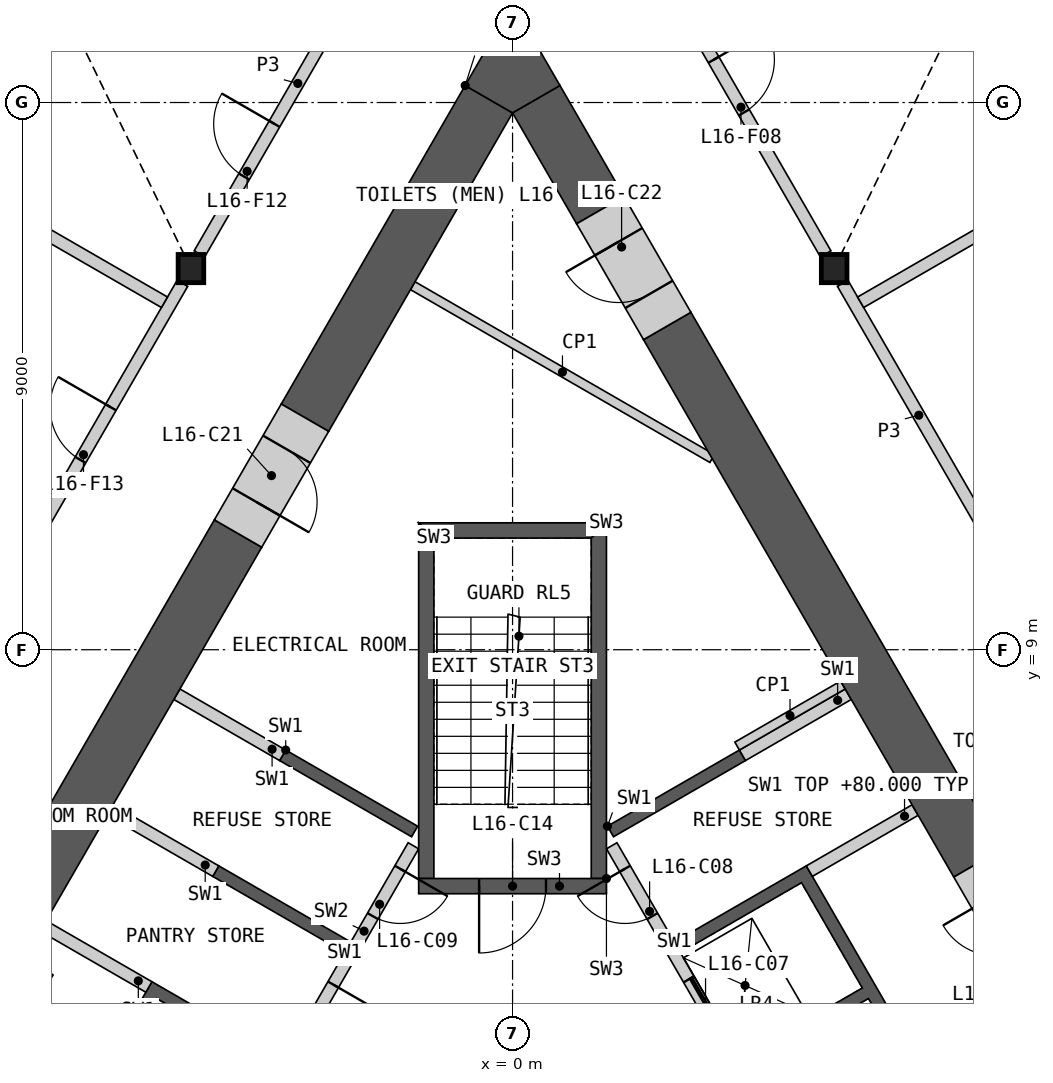
"""IFC4 building model, lengths in metres.
Left out: names, types, materials, properties, quantities, classifications, styles, units other than length and angle.
Written with IfcOpenShell. Run it as: python <this file> out.ifc"""

import sys

from ifc_helpers import new_model, si_unit, direction, frame, frame_2d, origin, origin_2d, place, context, subcontext, project, spatial, polyline, rectangle, i_section, outline, extrude, element, fill, save


model = new_model("IFC4")
c1 = context("Model", 3, precision=1e-05, world=origin(), true_north=direction((0.0, 1.0)))
c2 = subcontext(c1, "Body", "Model", "MODEL_VIEW")
j1 = project(units=[si_unit("LENGTHUNIT", "METRE"), si_unit("PLANEANGLEUNIT", "RADIAN")], contexts=[c1])
p1 = place(None, origin())
s1 = spatial("IfcSite", under=j1, at=p1, CompositionType="ELEMENT")
p2 = place(p1, origin())
s2 = spatial("IfcBuilding", under=s1, at=p2, CompositionType="ELEMENT")
p3 = place(p2, frame((0.0, 0.0, 76.2)))
s3 = spatial("IfcBuildingStorey", under=s2, at=p3, CompositionType="ELEMENT", Elevation=76.2)
for number, where, z_axis, x_axis in (
    (1, (-5.289, 15.269, 0.0), (0.0, 0.0, 1.0), (1.0, 0.0, 0.0)),
    (2, (5.289, 15.269, 0.0), (0.0, 0.0, 1.0), (1.0, 0.0, 0.0)),
):
    element("IfcColumn", number, at=place(p3, frame(where, z_axis=z_axis, x_axis=x_axis)), inside=s3, PredefinedType="COLUMN", context=c2, shape_type="SweptSolid", body=[
        extrude(i_section(OverallWidth=0.421, OverallDepth=0.465, WebThickness=0.045, FlangeThickness=0.072, at=origin_2d()), origin(), (0.0, 0.0, 1.0), 4.2),
    ])
p4 = place(p3, origin())
e3 = element("IfcWall", 3, at=p4, inside=s3, PredefinedType="SHEAR", context=c2, shape_type="SweptSolid", body=[
    extrude(outline(polyline([(1.561, 6.097), (3.731, 7.35), (3.831, 7.177), (1.66, 5.924), (1.561, 6.097)])), origin(), (0.0, 0.0, 1.0), 3.8),
])
p5 = place(p3, origin())
e4 = element("IfcWall", 4, at=p5, inside=s3, PredefinedType="SHEAR", context=c2, shape_type="SweptSolid", body=[
    extrude(outline(polyline([(2.66, 4.192), (4.831, 5.445), (8.231, -0.444), (6.061, -1.697), (5.96, -1.524), (7.952, -0.374), (6.952, 1.358), (4.96, 0.208), (4.861, 0.381), (6.852, 1.531), (5.852, 3.263), (3.861, 2.113), (3.76, 2.287), (5.752, 3.437), (4.752, 5.169), (2.76, 4.019), (2.66, 4.192)])), origin(), (0.0, 0.0, 1.0), 3.8),
])
p6 = place(p3, frame((5.817, -1.476, 0.0), z_axis=(0.0, 0.0, 1.0), x_axis=(-0.500002616675, 0.866023893041, 0.0)))
e5 = element("IfcWall", 5, at=p6, inside=s3, PredefinedType="SOLIDWALL", context=c2, shape_type="SweptSolid", body=[
    extrude(rectangle(XDim=8.373, YDim=0.2, at=frame_2d((4.187, 0.0))), origin(), (0.0, 0.0, 1.0), 3.8),
])
p7 = place(p6, frame((0.337, 0.0, 0.0)))
e6 = element("IfcOpeningElement", 6, at=p7, cuts=e5, PredefinedType="OPENING", context=c2, shape_type="SweptSolid", body=[
    extrude(rectangle(XDim=1.1, YDim=2.1, at=frame_2d((0.55, 1.05))), frame((0.0, 0.11, 0.0), z_axis=(0.0, -1.0, 0.0), x_axis=(1.0, 0.0, 0.0)), (0.0, 0.0, 1.0), 0.22),
])
p8 = place(p6, frame((2.537, 0.0, 0.0)))
e7 = element("IfcOpeningElement", 7, at=p8, cuts=e5, PredefinedType="OPENING", context=c2, shape_type="SweptSolid", body=[
    extrude(rectangle(XDim=1.1, YDim=2.1, at=frame_2d((0.55, 1.05))), frame((0.0, 0.11, 0.0), z_axis=(0.0, -1.0, 0.0), x_axis=(1.0, 0.0, 0.0)), (0.0, 0.0, 1.0), 0.22),
])
p9 = place(p6, frame((4.737, 0.0, 0.0)))
e8 = element("IfcOpeningElement", 8, at=p9, cuts=e5, PredefinedType="OPENING", context=c2, shape_type="SweptSolid", body=[
    extrude(rectangle(XDim=1.1, YDim=2.1, at=frame_2d((0.55, 1.05))), frame((0.0, 0.11, 0.0), z_axis=(0.0, -1.0, 0.0), x_axis=(1.0, 0.0, 0.0)), (0.0, 0.0, 1.0), 0.22),
])
p10 = place(p6, frame((7.037, 0.0, 0.0)))
e9 = element("IfcOpeningElement", 9, at=p10, cuts=e5, PredefinedType="OPENING", context=c2, shape_type="SweptSolid", body=[
    extrude(rectangle(XDim=0.9, YDim=2.1, at=frame_2d((0.45, 1.05))), frame((0.0, 0.11, 0.0), z_axis=(0.0, -1.0, 0.0), x_axis=(1.0, 0.0, 0.0)), (0.0, 0.0, 1.0), 0.22),
])
p11 = place(p3, frame((4.881, 5.358, 0.0), z_axis=(0.0, 0.0, 1.0), x_axis=(0.866035824272, 0.499981950752, 0.0)))
e10 = element("IfcWall", 10, at=p11, inside=s3, PredefinedType="SHEAR", context=c2, shape_type="SweptSolid", body=[
    extrude(rectangle(XDim=2.009, YDim=0.2, at=frame_2d((1.004, 0.0))), origin(), (0.0, 0.0, 1.0), 3.8),
])
p12 = place(p3, frame((3.781, 7.263, 0.0), z_axis=(0.0, 0.0, 1.0), x_axis=(0.865983199114, 0.50007309351, 0.0)))
e11 = element("IfcWall", 11, at=p12, inside=s3, PredefinedType="SHEAR", context=c2, shape_type="SweptSolid", body=[
    extrude(rectangle(XDim=2.009, YDim=0.2, at=frame_2d((1.004, 0.0))), origin(), (0.0, 0.0, 1.0), 3.8),
])
p13 = place(p3, origin())
e12 = element("IfcWall", 12, at=p13, inside=s3, PredefinedType="SHEAR", context=c2, shape_type="SweptSolid", body=[
    extrude(outline(polyline([(-4.96, 0.208), (-7.131, 1.461), (-5.931, 3.54), (-3.76, 2.287), (-3.861, 2.113), (-5.852, 3.263), (-6.852, 1.531), (-4.861, 0.381), (-4.96, 0.208)])), origin(), (0.0, 0.0, 1.0), 3.8),
])
p14 = place(p3, origin())
e13 = element("IfcWall", 13, at=p14, inside=s3, PredefinedType="SHEAR", context=c2, shape_type="SweptSolid", body=[
    extrude(outline(polyline([(-2.76, 4.019), (-4.931, 5.272), (-4.831, 5.445), (-2.66, 4.192), (-2.76, 4.019)])), origin(), (0.0, 0.0, 1.0), 3.8),
])
p15 = place(p3, origin())
e14 = element("IfcWall", 14, at=p15, inside=s3, PredefinedType="SHEAR", context=c2, shape_type="SweptSolid", body=[
    extrude(outline(polyline([(-3.731, 7.35), (-1.561, 6.097), (-1.66, 5.924), (-3.831, 7.177), (-3.731, 7.35)])), origin(), (0.0, 0.0, 1.0), 3.8),
])
p16 = place(p3, frame((-1.631, 5.776, 0.0), z_axis=(0.0, 0.0, 1.0), x_axis=(-0.499992876559, -0.866029516466, 0.0)))
e15 = element("IfcWall", 15, at=p16, inside=s3, PredefinedType="SOLIDWALL", context=c2, shape_type="SweptSolid", body=[
    extrude(rectangle(XDim=6.486, YDim=0.2, at=frame_2d((3.243, 0.0))), origin(), (0.0, 0.0, 1.0), 3.8),
])
p17 = place(p16, frame((0.437, 0.0, 0.0)))
e16 = element("IfcOpeningElement", 16, at=p17, cuts=e15, PredefinedType="OPENING", context=c2, shape_type="SweptSolid", body=[
    extrude(rectangle(XDim=0.9, YDim=2.1, at=frame_2d((0.45, 1.05))), frame((0.0, 0.11, 0.0), z_axis=(0.0, -1.0, 0.0), x_axis=(1.0, 0.0, 0.0)), (0.0, 0.0, 1.0), 0.22),
])
p18 = place(p16, frame((2.637, 0.0, 0.0)))
e17 = element("IfcOpeningElement", 17, at=p18, cuts=e15, PredefinedType="OPENING", context=c2, shape_type="SweptSolid", body=[
    extrude(rectangle(XDim=0.9, YDim=2.1, at=frame_2d((0.45, 1.05))), frame((0.0, 0.11, 0.0), z_axis=(0.0, -1.0, 0.0), x_axis=(1.0, 0.0, 0.0)), (0.0, 0.0, 1.0), 0.22),
])
p19 = place(p3, frame((-3.781, 7.263, 0.0), z_axis=(0.0, 0.0, 1.0), x_axis=(-0.865983199114, 0.50007309351, 0.0)))
e18 = element("IfcWall", 18, at=p19, inside=s3, PredefinedType="SHEAR", context=c2, shape_type="SweptSolid", body=[
    extrude(rectangle(XDim=2.009, YDim=0.2, at=frame_2d((1.004, 0.0))), origin(), (0.0, 0.0, 1.0), 3.8),
])
p20 = place(p3, frame((-4.881, 5.358, 0.0), z_axis=(0.0, 0.0, 1.0), x_axis=(-0.866035824272, 0.499981950752, 0.0)))
e19 = element("IfcWall", 19, at=p20, inside=s3, PredefinedType="SHEAR", context=c2, shape_type="SweptSolid", body=[
    extrude(rectangle(XDim=2.009, YDim=0.2, at=frame_2d((1.004, 0.0))), origin(), (0.0, 0.0, 1.0), 3.8),
])
p21 = place(p3, frame((-5.981, 3.453, 0.0), z_axis=(0.0, 0.0, 1.0), x_axis=(-0.866013584312, 0.500020471368, 0.0)))
e20 = element("IfcWall", 20, at=p21, inside=s3, PredefinedType="SHEAR", context=c2, shape_type="SweptSolid", body=[
    extrude(rectangle(XDim=2.009, YDim=0.2, at=frame_2d((1.005, 0.0))), origin(), (0.0, 0.0, 1.0), 3.8),
])
p22 = place(p3, origin())
e21 = element("IfcWall", 21, at=p22, inside=s3, PredefinedType="SHEAR", context=c2, shape_type="SweptSolid", body=[
    extrude(outline(polyline([(1.544, 5.237), (1.544, 11.087), (1.294, 10.837), (1.294, 5.237), (1.544, 5.237)])), origin(), (0.0, 0.0, 1.0), 3.8),
])
p23 = place(p3, origin())
e22 = element("IfcWall", 22, at=p23, inside=s3, PredefinedType="SHEAR", context=c2, shape_type="SweptSolid", body=[
    extrude(outline(polyline([(1.544, 11.087), (-1.544, 11.087), (-1.294, 10.837), (1.294, 10.837), (1.544, 11.087)])), origin(), (0.0, 0.0, 1.0), 3.8),
])
p24 = place(p3, origin())
e23 = element("IfcWall", 23, at=p24, inside=s3, PredefinedType="SHEAR", context=c2, shape_type="SweptSolid", body=[
    extrude(outline(polyline([(-1.294, 10.837), (-1.544, 11.087), (-1.544, 5.237), (-1.294, 5.237), (-1.294, 10.837)])), origin(), (0.0, 0.0, 1.0), 3.8),
])
p25 = place(p3, frame((1.544, 5.112, 0.0), z_axis=(0.0, 0.0, 1.0), x_axis=(-1.0, 0.0, 0.0)))
e24 = element("IfcWall", 24, at=p25, inside=s3, PredefinedType="SHEAR", context=c2, shape_type="SweptSolid", body=[
    extrude(rectangle(XDim=3.088, YDim=0.25, at=frame_2d((1.544, 0.0))), origin(), (0.0, 0.0, 1.0), 3.8),
])
p26 = place(p25, frame((0.994, 0.0, 0.0)))
e25 = element("IfcOpeningElement", 25, at=p26, cuts=e24, PredefinedType="OPENING", context=c2, shape_type="SweptSolid", body=[
    extrude(rectangle(XDim=1.1, YDim=2.1, at=frame_2d((0.55, 1.05))), frame((0.0, 0.135, 0.0), z_axis=(0.0, -1.0, 0.0), x_axis=(1.0, 0.0, 0.0)), (0.0, 0.0, 1.0), 0.27),
])
p27 = place(p3, frame((3.693, 7.415, 0.0), z_axis=(0.0, 0.0, 1.0), x_axis=(0.866035824272, 0.499981950752, 0.0)))
e26 = element("IfcWall", 26, at=p27, inside=s3, PredefinedType="PARTITIONING", context=c2, shape_type="SweptSolid", body=[
    extrude(rectangle(XDim=2.009, YDim=0.15, at=frame_2d((1.004, 0.0))), origin(), (0.0, 0.0, 1.0), 3.8),
])
p28 = place(p3, frame((-1.641, 14.987, 0.0), z_axis=(0.0, 0.0, 1.0), x_axis=(0.866033267067, -0.499986380149, 0.0)))
e27 = element("IfcWall", 27, at=p28, inside=s3, PredefinedType="PARTITIONING", context=c2, shape_type="SweptSolid", body=[
    extrude(rectangle(XDim=5.685, YDim=0.15, at=frame_2d((2.843, 0.0))), origin(), (0.0, 0.0, 1.0), 3.8),
])
p29 = place(p3, frame((7.646, 5.486, 0.0), z_axis=(0.0, 0.0, 1.0), x_axis=(-0.499982660725, 0.866035414388, 0.0)))
e28 = element("IfcWall", 28, at=p29, inside=s3, PredefinedType="SHEAR", context=c2, shape_type="SweptSolid", body=[
    extrude(rectangle(XDim=10.206, YDim=0.9, at=frame_2d((5.103, 0.0))), origin(), (0.0, 0.0, 1.0), 3.8),
])
p30 = place(p3, frame((1.443, 16.23, 0.0), z_axis=(0.0, 0.0, 1.0), x_axis=(-0.500026652407, 0.866010015463, 0.0)))
e29 = element("IfcWall", 29, at=p30, inside=s3, PredefinedType="SHEAR", context=c2, shape_type="SweptSolid", body=[
    extrude(rectangle(XDim=2.107, YDim=0.9, at=frame_2d((1.054, 0.0))), origin(), (0.0, 0.0, 1.0), 3.8),
])
p31 = place(p3, frame((-4.514, 10.911, 0.0), z_axis=(0.0, 0.0, 1.0), x_axis=(-0.500006662879, -0.866021556935, 0.0)))
e30 = element("IfcWall", 30, at=p31, inside=s3, PredefinedType="SHEAR", context=c2, shape_type="SweptSolid", body=[
    extrude(rectangle(XDim=7.312, YDim=0.9, at=frame_2d((3.656, 0.0))), origin(), (0.0, 0.0, 1.0), 3.8),
])
p32 = place(p3, frame((-0.39, 18.055, 0.0), z_axis=(0.0, 0.0, 1.0), x_axis=(-0.500006596359, -0.866021595341, 0.0)))
e31 = element("IfcWall", 31, at=p32, inside=s3, PredefinedType="SHEAR", context=c2, shape_type="SweptSolid", body=[
    extrude(rectangle(XDim=6.049, YDim=0.9, at=frame_2d((3.025, 0.0))), origin(), (0.0, 0.0, 1.0), 3.8),
])
p33 = place(p3, origin())
e32 = element("IfcWall", 32, at=p33, inside=s3, PredefinedType="SHEAR", context=c2, shape_type="SweptSolid", body=[
    extrude(outline(polyline([(-0.779, 18.28), (0.0, 19.63), (0.779, 18.28), (0.0, 17.83), (-0.779, 18.28)])), origin(), (0.0, 0.0, 1.0), 3.8),
])
p34 = place(p3, frame((8.747, 3.58, 0.0), z_axis=(0.0, 0.0, 1.0), x_axis=(-0.50002983664, 0.866008176907, 0.0)))
e33 = element("IfcWall", 33, at=p34, inside=s3, PredefinedType="SHEAR", context=c2, shape_type="SweptSolid", body=[
    extrude(rectangle(XDim=2.2, YDim=0.9, at=frame_2d((1.1, 0.0))), origin(), (0.0, 0.0, 1.0), 3.8),
])
p35 = place(p34, frame((0.6, 0.0, 0.0)))
e34 = element("IfcOpeningElement", 34, at=p35, cuts=e33, PredefinedType="OPENING", context=c2, shape_type="SweptSolid", body=[
    extrude(rectangle(XDim=1.0, YDim=2.1, at=frame_2d((0.5, 1.05))), frame((0.0, 0.46, 0.0), z_axis=(0.0, -1.0, 0.0), x_axis=(1.0, 0.0, 0.0)), (0.0, 0.0, 1.0), 0.92),
])
p36 = place(p3, frame((-3.414, 12.816, 0.0), z_axis=(0.0, 0.0, 1.0), x_axis=(-0.50002983664, -0.866008176907, 0.0)))
e35 = element("IfcWall", 35, at=p36, inside=s3, PredefinedType="SHEAR", context=c2, shape_type="SweptSolid", body=[
    extrude(rectangle(XDim=2.2, YDim=0.9, at=frame_2d((1.1, 0.0))), origin(), (0.0, 0.0, 1.0), 3.8),
])
p37 = place(p36, frame((0.6, 0.0, 0.0)))
e36 = element("IfcOpeningElement", 36, at=p37, cuts=e35, PredefinedType="OPENING", context=c2, shape_type="SweptSolid", body=[
    extrude(rectangle(XDim=1.0, YDim=2.1, at=frame_2d((0.5, 1.05))), frame((0.0, 0.46, 0.0), z_axis=(0.0, -1.0, 0.0), x_axis=(1.0, 0.0, 0.0)), (0.0, 0.0, 1.0), 0.92),
])
p38 = place(p3, frame((2.543, 14.325, 0.0), z_axis=(0.0, 0.0, 1.0), x_axis=(-0.50002983664, 0.866008176907, 0.0)))
e37 = element("IfcWall", 37, at=p38, inside=s3, PredefinedType="SHEAR", context=c2, shape_type="SweptSolid", body=[
    extrude(rectangle(XDim=2.2, YDim=0.9, at=frame_2d((1.1, 0.0))), origin(), (0.0, 0.0, 1.0), 3.8),
])
p39 = place(p38, frame((0.6, 0.0, 0.0)))
e38 = element("IfcOpeningElement", 38, at=p39, cuts=e37, PredefinedType="OPENING", context=c2, shape_type="SweptSolid", body=[
    extrude(rectangle(XDim=1.0, YDim=2.1, at=frame_2d((0.5, 1.05))), frame((0.0, 0.46, 0.0), z_axis=(0.0, -1.0, 0.0), x_axis=(1.0, 0.0, 0.0)), (0.0, 0.0, 1.0), 0.92),
])
p40 = place(p3, frame((5.429, 15.026, 0.0), z_axis=(0.0, 0.0, 1.0), x_axis=(0.50001002959, -0.86601961312, 0.0)))
e39 = element("IfcWall", 39, at=p40, inside=s3, PredefinedType="PARTITIONING", context=c2, shape_type="SweptSolid", body=[
    extrude(rectangle(XDim=10.019, YDim=0.2, at=frame_2d((5.009, 0.0))), origin(), (0.0, 0.0, 1.0), 3.8),
])
p41 = place(p40, frame((4.76, 0.0, 0.0)))
e40 = element("IfcOpeningElement", 40, at=p41, cuts=e39, PredefinedType="OPENING", context=c2, shape_type="SweptSolid", body=[
    extrude(rectangle(XDim=1.0, YDim=2.1, at=frame_2d((0.5, 1.05))), frame((0.0, 0.11, 0.0), z_axis=(0.0, -1.0, 0.0), x_axis=(1.0, 0.0, 0.0)), (0.0, 0.0, 1.0), 0.22),
])
p42 = place(p3, frame((-10.439, 6.35, 0.0), z_axis=(0.0, 0.0, 1.0), x_axis=(0.50001002959, 0.86601961312, 0.0)))
e41 = element("IfcWall", 41, at=p42, inside=s3, PredefinedType="PARTITIONING", context=c2, shape_type="SweptSolid", body=[
    extrude(rectangle(XDim=10.019, YDim=0.2, at=frame_2d((5.009, 0.0))), origin(), (0.0, 0.0, 1.0), 3.8),
])
p43 = place(p42, frame((6.664, 0.0, 0.0)))
e42 = element("IfcOpeningElement", 42, at=p43, cuts=e41, PredefinedType="OPENING", context=c2, shape_type="SweptSolid", body=[
    extrude(rectangle(XDim=1.0, YDim=2.1, at=frame_2d((0.5, 1.05))), frame((0.0, 0.11, 0.0), z_axis=(0.0, -1.0, 0.0), x_axis=(1.0, 0.0, 0.0)), (0.0, 0.0, 1.0), 0.22),
])
p44 = place(p42, frame((1.854, 0.0, 0.0)))
e43 = element("IfcOpeningElement", 43, at=p44, cuts=e41, PredefinedType="OPENING", context=c2, shape_type="SweptSolid", body=[
    extrude(rectangle(XDim=1.0, YDim=2.1, at=frame_2d((0.5, 1.05))), frame((0.0, 0.11, 0.0), z_axis=(0.0, -1.0, 0.0), x_axis=(1.0, 0.0, 0.0)), (0.0, 0.0, 1.0), 0.22),
])
p45 = place(p3, frame((1.913, 21.116, 0.0), z_axis=(0.0, 0.0, 1.0), x_axis=(0.500001069878, -0.866024786089, 0.0)))
e44 = element("IfcWall", 44, at=p45, inside=s3, PredefinedType="PARTITIONING", context=c2, shape_type="SweptSolid", body=[
    extrude(rectangle(XDim=6.473, YDim=0.2, at=frame_2d((3.236, 0.0))), origin(), (0.0, 0.0, 1.0), 3.8),
])
p46 = place(p45, frame((2.787, 0.0, 0.0)))
e45 = element("IfcOpeningElement", 45, at=p46, cuts=e44, PredefinedType="OPENING", context=c2, shape_type="SweptSolid", body=[
    extrude(rectangle(XDim=1.0, YDim=2.1, at=frame_2d((0.5, 1.05))), frame((0.0, 0.11, 0.0), z_axis=(0.0, -1.0, 0.0), x_axis=(1.0, 0.0, 0.0)), (0.0, 0.0, 1.0), 0.22),
])
p47 = place(p3, frame((-5.149, 15.511, 0.0), z_axis=(0.0, 0.0, 1.0), x_axis=(0.500001069878, 0.866024786089, 0.0)))
e46 = element("IfcWall", 46, at=p47, inside=s3, PredefinedType="PARTITIONING", context=c2, shape_type="SweptSolid", body=[
    extrude(rectangle(XDim=6.473, YDim=0.2, at=frame_2d((3.236, 0.0))), origin(), (0.0, 0.0, 1.0), 3.8),
])
p48 = place(p47, frame((4.715, 0.0, 0.0)))
e47 = element("IfcOpeningElement", 47, at=p48, cuts=e46, PredefinedType="OPENING", context=c2, shape_type="SweptSolid", body=[
    extrude(rectangle(XDim=1.0, YDim=2.1, at=frame_2d((0.5, 1.05))), frame((0.0, 0.11, 0.0), z_axis=(0.0, -1.0, 0.0), x_axis=(1.0, 0.0, 0.0)), (0.0, 0.0, 1.0), 0.22),
])
p49 = place(p47, frame((1.468, 0.0, 0.0)))
e48 = element("IfcOpeningElement", 48, at=p49, cuts=e46, PredefinedType="OPENING", context=c2, shape_type="SweptSolid", body=[
    extrude(rectangle(XDim=1.0, YDim=2.1, at=frame_2d((0.5, 1.05))), frame((0.0, 0.11, 0.0), z_axis=(0.0, -1.0, 0.0), x_axis=(1.0, 0.0, 0.0)), (0.0, 0.0, 1.0), 0.22),
])
for number, where, z_axis, x_axis in (
    (49, (5.725, 14.715, 0.0), (0.0, 0.0, 1.0), (0.866, 0.5, 0.0)),
    (50, (-16.981, 21.213, 0.0), (0.0, 0.0, 1.0), (0.866, -0.5, 0.0)),
):
    element("IfcWall", number, at=place(p3, frame(where, z_axis=z_axis, x_axis=x_axis)), inside=s3, PredefinedType="PARTITIONING", context=c2, shape_type="SweptSolid", body=[
        extrude(rectangle(XDim=12.998, YDim=0.2, at=frame_2d((6.499, 0.0))), origin(), (0.0, 0.0, 1.0), 2.885),
    ])
p50 = place(p9, origin())
e51 = element("IfcDoor", 51, at=p50, inside=s3, OperationType="SLIDING_TO_LEFT", PredefinedType="DOOR", context=c2, shape_type="SweptSolid", body=[
    extrude(rectangle(XDim=1.1, YDim=2.1, at=frame_2d((0.55, 1.05))), frame((0.0, 0.025, 0.0), z_axis=(0.0, -1.0, 0.0), x_axis=(1.0, 0.0, 0.0)), (0.0, 0.0, 1.0), 0.05),
])
fill(e8, e51)
p51 = place(p10, origin())
e52 = element("IfcDoor", 52, at=p51, inside=s3, OperationType="SINGLE_SWING_RIGHT", PredefinedType="DOOR", context=c2, shape_type="SweptSolid", body=[
    extrude(rectangle(XDim=0.9, YDim=2.1, at=frame_2d((0.45, 1.05))), frame((0.0, 0.025, 0.0), z_axis=(0.0, -1.0, 0.0), x_axis=(1.0, 0.0, 0.0)), (0.0, 0.0, 1.0), 0.05),
])
fill(e9, e52)
p52 = place(p17, origin())
e53 = element("IfcDoor", 53, at=p52, inside=s3, OperationType="SINGLE_SWING_LEFT", PredefinedType="DOOR", context=c2, shape_type="SweptSolid", body=[
    extrude(rectangle(XDim=0.9, YDim=2.1, at=frame_2d((0.45, 1.05))), frame((0.0, 0.025, 0.0), z_axis=(0.0, -1.0, 0.0), x_axis=(1.0, 0.0, 0.0)), (0.0, 0.0, 1.0), 0.05),
])
fill(e16, e53)
p53 = place(p18, origin())
e54 = element("IfcDoor", 54, at=p53, inside=s3, OperationType="SINGLE_SWING_LEFT", PredefinedType="DOOR", context=c2, shape_type="SweptSolid", body=[
    extrude(rectangle(XDim=0.9, YDim=2.1, at=frame_2d((0.45, 1.05))), frame((0.0, 0.025, 0.0), z_axis=(0.0, -1.0, 0.0), x_axis=(1.0, 0.0, 0.0)), (0.0, 0.0, 1.0), 0.05),
])
fill(e17, e54)
p54 = place(p26, origin())
e55 = element("IfcDoor", 55, at=p54, inside=s3, OperationType="SINGLE_SWING_RIGHT", PredefinedType="DOOR", context=c2, shape_type="SweptSolid", body=[
    extrude(rectangle(XDim=1.1, YDim=2.1, at=frame_2d((0.55, 1.05))), frame((0.0, 0.025, 0.0), z_axis=(0.0, -1.0, 0.0), x_axis=(1.0, 0.0, 0.0)), (0.0, 0.0, 1.0), 0.05),
])
fill(e25, e55)
p55 = place(p37, origin())
e56 = element("IfcDoor", 56, at=p55, inside=s3, OperationType="SINGLE_SWING_RIGHT", PredefinedType="DOOR", context=c2, shape_type="SweptSolid", body=[
    extrude(rectangle(XDim=1.0, YDim=2.1, at=frame_2d((0.5, 1.05))), frame((0.0, 0.205, 0.0), z_axis=(0.0, -1.0, 0.0), x_axis=(1.0, 0.0, 0.0)), (0.0, 0.0, 1.0), 0.05),
])
fill(e36, e56)
p56 = place(p39, origin())
e57 = element("IfcDoor", 57, at=p56, inside=s3, OperationType="SINGLE_SWING_RIGHT", PredefinedType="DOOR", context=c2, shape_type="SweptSolid", body=[
    extrude(rectangle(XDim=1.0, YDim=2.1, at=frame_2d((0.5, 1.05))), frame((0.0, 0.205, 0.0), z_axis=(0.0, -1.0, 0.0), x_axis=(1.0, 0.0, 0.0)), (0.0, 0.0, 1.0), 0.05),
])
fill(e38, e57)
p57 = place(p46, origin())
e58 = element("IfcDoor", 58, at=p57, inside=s3, OperationType="SINGLE_SWING_LEFT", PredefinedType="DOOR", context=c2, shape_type="SweptSolid", body=[
    extrude(rectangle(XDim=1.0, YDim=2.1, at=frame_2d((0.5, 1.05))), frame((0.0, 0.025, 0.0), z_axis=(0.0, -1.0, 0.0), x_axis=(1.0, 0.0, 0.0)), (0.0, 0.0, 1.0), 0.05),
])
fill(e45, e58)
p58 = place(p49, origin())
e59 = element("IfcDoor", 59, at=p58, inside=s3, OperationType="SINGLE_SWING_RIGHT", PredefinedType="DOOR", context=c2, shape_type="SweptSolid", body=[
    extrude(rectangle(XDim=1.0, YDim=2.1, at=frame_2d((0.5, 1.05))), frame((0.0, 0.025, 0.0), z_axis=(0.0, -1.0, 0.0), x_axis=(1.0, 0.0, 0.0)), (0.0, 0.0, 1.0), 0.05),
])
fill(e48, e59)
p59 = place(p43, origin())
e60 = element("IfcDoor", 60, at=p59, inside=s3, OperationType="SINGLE_SWING_RIGHT", PredefinedType="DOOR", context=c2, shape_type="SweptSolid", body=[
    extrude(rectangle(XDim=1.0, YDim=2.1, at=frame_2d((0.5, 1.05))), frame((0.0, 0.025, 0.0), z_axis=(0.0, -1.0, 0.0), x_axis=(1.0, 0.0, 0.0)), (0.0, 0.0, 1.0), 0.05),
])
fill(e42, e60)
save(model, sys.argv[1])
